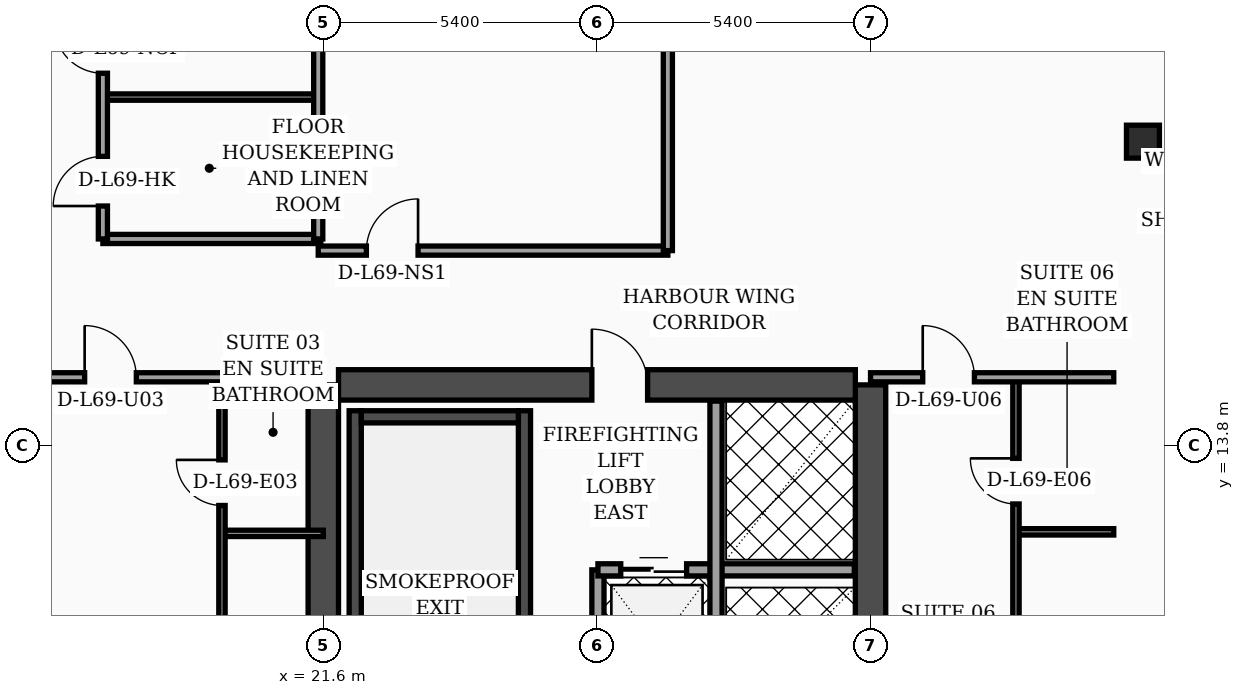
"""IFC4 building model, lengths in metres.
Left out: names, types, materials, properties, quantities, classifications, styles, units other than length and angle.
Written with IfcOpenShell. Run it as: python <this file> out.ifc"""

import sys

from ifc_helpers import new_model, si_unit, direction, frame, frame_2d, origin, origin_2d, place, context, subcontext, project, spatial, rectangle, hollow_rectangle, extrude, element, fill, save


model = new_model("IFC4")
c1 = context("Model", 3, precision=1e-05, world=origin(), true_north=direction((0.0, 1.0)))
c2 = subcontext(c1, "Body", "Model", "MODEL_VIEW")
j1 = project(units=[si_unit("LENGTHUNIT", "METRE"), si_unit("PLANEANGLEUNIT", "RADIAN")], contexts=[c1])
p1 = place(None, origin())
s1 = spatial("IfcSite", under=j1, at=p1, CompositionType="ELEMENT")
p2 = place(p1, origin())
s2 = spatial("IfcBuilding", under=s1, at=p2, CompositionType="ELEMENT")
p3 = place(p2, frame((0.0, 0.0, 278.7)))
s3 = spatial("IfcBuildingStorey", under=s2, at=p3, CompositionType="ELEMENT", Elevation=278.7)
for number, where, z_axis, x_axis in (
    (1, (21.6, 4.6, 0.0), (0.0, 0.0, 1.0), (0.0, 1.0, 0.0)),
    (2, (32.4, 4.6, 0.0), (0.0, 0.0, 1.0), (0.0, 1.0, 0.0)),
):
    element("IfcWall", number, at=place(p3, frame(where, z_axis=z_axis, x_axis=x_axis)), inside=s3, PredefinedType="SHEAR", context=c2, shape_type="SweptSolid", body=[
        extrude(rectangle(XDim=10.4, YDim=0.6, at=frame_2d((5.2, 0.0))), origin(), (0.0, 0.0, 1.0), 3.52),
    ])
p4 = place(p3, frame((21.9, 15.0, 0.0), z_axis=(0.0, 0.0, 1.0), x_axis=(1.0, 0.0, 0.0)))
e3 = element("IfcWall", 3, at=p4, inside=s3, PredefinedType="SHEAR", context=c2, shape_type="SweptSolid", body=[
    extrude(rectangle(XDim=10.2, YDim=0.6, at=frame_2d((5.1, 0.0))), origin(), (0.0, 0.0, 1.0), 3.52),
])
p5 = place(p4, frame((5.0, 0.0, 0.0)))
e4 = element("IfcOpeningElement", 4, at=p5, cuts=e3, PredefinedType="OPENING", context=c2, shape_type="SweptSolid", body=[
    extrude(rectangle(XDim=1.1, YDim=2.2, at=frame_2d((0.55, 1.1))), frame((0.0, 0.31, 0.0), z_axis=(0.0, -1.0, 0.0), x_axis=(1.0, 0.0, 0.0)), (0.0, 0.0, 1.0), 0.62),
])
p6 = place(p3, frame((22.23, 4.9, 0.0), z_axis=(0.0, 0.0, 1.0), x_axis=(0.0, 1.0, 0.0)))
e5 = element("IfcWall", 5, at=p6, inside=s3, PredefinedType="SOLIDWALL", context=c2, shape_type="SweptSolid", body=[
    extrude(rectangle(XDim=9.59, YDim=0.24, at=frame_2d((4.795, 0.0))), origin(), (0.0, 0.0, 1.0), 3.52),
])
p7 = place(p3, frame((25.57, 4.9, 0.0), z_axis=(0.0, 0.0, 1.0), x_axis=(0.0, 1.0, 0.0)))
e6 = element("IfcWall", 6, at=p7, inside=s3, PredefinedType="SOLIDWALL", context=c2, shape_type="SweptSolid", body=[
    extrude(rectangle(XDim=9.59, YDim=0.24, at=frame_2d((4.795, 0.0))), origin(), (0.0, 0.0, 1.0), 3.52),
])
p8 = place(p7, frame((0.35, 0.0, 0.0)))
e7 = element("IfcOpeningElement", 7, at=p8, cuts=e6, PredefinedType="OPENING", context=c2, shape_type="SweptSolid", body=[
    extrude(rectangle(XDim=1.15, YDim=2.2, at=frame_2d((0.575, 1.1))), frame((0.0, 0.13, 0.0), z_axis=(0.0, -1.0, 0.0), x_axis=(1.0, 0.0, 0.0)), (0.0, 0.0, 1.0), 0.26),
])
p9 = place(p3, frame((22.35, 14.37, 0.0), z_axis=(0.0, 0.0, 1.0), x_axis=(1.0, 0.0, 0.0)))
e8 = element("IfcWall", 8, at=p9, inside=s3, PredefinedType="SOLIDWALL", context=c2, shape_type="SweptSolid", body=[
    extrude(rectangle(XDim=3.1, YDim=0.24, at=frame_2d((1.55, 0.0))), origin(), (0.0, 0.0, 1.0), 3.52),
])
p10 = place(p3, frame((37.776, 19.8, 0.0), z_axis=(0.0, 0.0, 1.0), x_axis=(1.0, 0.0, 0.0)))
e9 = element("IfcColumn", 9, at=p10, inside=s3, PredefinedType="COLUMN", context=c2, shape_type="SweptSolid", body=[
    extrude(hollow_rectangle(XDim=0.65, YDim=0.65, WallThickness=0.028, at=origin_2d()), origin(), (0.0, 0.0, 1.0), 3.52),
])
p11 = place(p3, frame((43.83, 5.505, 0.0), z_axis=(0.0, 0.0, 1.0), x_axis=(-0.300509063924, 0.953778958931, 0.0)))
e10 = element("IfcWall", 10, at=p11, inside=s3, PredefinedType="SOLIDWALL", context=c2, shape_type="SweptSolid", body=[
    extrude(rectangle(XDim=30.814, YDim=0.32, at=frame_2d((15.407, 0.0))), origin(), (0.0, 0.0, 1.0), 3.52),
])
p12 = place(p11, frame((18.796, 0.0, 0.0)))
e11 = element("IfcOpeningElement", 11, at=p12, cuts=e10, PredefinedType="OPENING", context=c2, shape_type="SweptSolid", body=[
    extrude(rectangle(XDim=1.4, YDim=2.25, at=frame_2d((0.7, 1.125))), frame((0.0, 0.17, 0.0), z_axis=(0.0, -1.0, 0.0), x_axis=(1.0, 0.0, 0.0)), (0.0, 0.0, 1.0), 0.34),
])
p13 = place(p11, frame((4.437, 0.0, 0.7)))
e12 = element("IfcOpeningElement", 12, at=p13, cuts=e10, PredefinedType="OPENING", context=c2, shape_type="SweptSolid", body=[
    extrude(rectangle(XDim=1.6, YDim=1.65, at=frame_2d((0.8, 0.825))), frame((0.0, 0.17, 0.0), z_axis=(0.0, -1.0, 0.0), x_axis=(1.0, 0.0, 0.0)), (0.0, 0.0, 1.0), 0.34),
])
p14 = place(p11, frame((9.889, 0.0, 0.7)))
e13 = element("IfcOpeningElement", 13, at=p14, cuts=e10, PredefinedType="OPENING", context=c2, shape_type="SweptSolid", body=[
    extrude(rectangle(XDim=1.6, YDim=1.65, at=frame_2d((0.8, 0.825))), frame((0.0, 0.17, 0.0), z_axis=(0.0, -1.0, 0.0), x_axis=(1.0, 0.0, 0.0)), (0.0, 0.0, 1.0), 0.34),
])
p15 = place(p11, frame((1.6, 0.0, 0.75)))
e14 = element("IfcOpeningElement", 14, at=p15, cuts=e10, PredefinedType="OPENING", context=c2, shape_type="SweptSolid", body=[
    extrude(rectangle(XDim=1.5, YDim=1.6, at=frame_2d((0.75, 0.8))), frame((0.0, 0.17, 0.0), z_axis=(0.0, -1.0, 0.0), x_axis=(1.0, 0.0, 0.0)), (0.0, 0.0, 1.0), 0.34),
])
p16 = place(p11, frame((7.8, 0.0, 0.75)))
e15 = element("IfcOpeningElement", 15, at=p16, cuts=e10, PredefinedType="OPENING", context=c2, shape_type="SweptSolid", body=[
    extrude(rectangle(XDim=1.5, YDim=1.6, at=frame_2d((0.75, 0.8))), frame((0.0, 0.17, 0.0), z_axis=(0.0, -1.0, 0.0), x_axis=(1.0, 0.0, 0.0)), (0.0, 0.0, 1.0), 0.34),
])
p17 = place(p11, frame((11.95, 0.0, 0.75)))
e16 = element("IfcOpeningElement", 16, at=p17, cuts=e10, PredefinedType="OPENING", context=c2, shape_type="SweptSolid", body=[
    extrude(rectangle(XDim=1.5, YDim=1.6, at=frame_2d((0.75, 0.8))), frame((0.0, 0.17, 0.0), z_axis=(0.0, -1.0, 0.0), x_axis=(1.0, 0.0, 0.0)), (0.0, 0.0, 1.0), 0.34),
])
p18 = place(p11, frame((14.0, 0.0, 0.75)))
e17 = element("IfcOpeningElement", 17, at=p18, cuts=e10, PredefinedType="OPENING", context=c2, shape_type="SweptSolid", body=[
    extrude(rectangle(XDim=1.5, YDim=1.6, at=frame_2d((0.75, 0.8))), frame((0.0, 0.17, 0.0), z_axis=(0.0, -1.0, 0.0), x_axis=(1.0, 0.0, 0.0)), (0.0, 0.0, 1.0), 0.34),
])
p19 = place(p11, frame((16.55, 0.0, 0.75)))
e18 = element("IfcOpeningElement", 18, at=p19, cuts=e10, PredefinedType="OPENING", context=c2, shape_type="SweptSolid", body=[
    extrude(rectangle(XDim=1.5, YDim=1.6, at=frame_2d((0.75, 0.8))), frame((0.0, 0.17, 0.0), z_axis=(0.0, -1.0, 0.0), x_axis=(1.0, 0.0, 0.0)), (0.0, 0.0, 1.0), 0.34),
])
p20 = place(p11, frame((20.75, 0.0, 0.75)))
e19 = element("IfcOpeningElement", 19, at=p20, cuts=e10, PredefinedType="OPENING", context=c2, shape_type="SweptSolid", body=[
    extrude(rectangle(XDim=1.5, YDim=1.6, at=frame_2d((0.75, 0.8))), frame((0.0, 0.17, 0.0), z_axis=(0.0, -1.0, 0.0), x_axis=(1.0, 0.0, 0.0)), (0.0, 0.0, 1.0), 0.34),
])
p21 = place(p11, frame((23.3, 0.0, 0.75)))
e20 = element("IfcOpeningElement", 20, at=p21, cuts=e10, PredefinedType="OPENING", context=c2, shape_type="SweptSolid", body=[
    extrude(rectangle(XDim=1.5, YDim=1.6, at=frame_2d((0.75, 0.8))), frame((0.0, 0.17, 0.0), z_axis=(0.0, -1.0, 0.0), x_axis=(1.0, 0.0, 0.0)), (0.0, 0.0, 1.0), 0.34),
])
p22 = place(p11, frame((26.4, 0.0, 0.75)))
e21 = element("IfcOpeningElement", 21, at=p22, cuts=e10, PredefinedType="OPENING", context=c2, shape_type="SweptSolid", body=[
    extrude(rectangle(XDim=1.5, YDim=1.6, at=frame_2d((0.75, 0.8))), frame((0.0, 0.17, 0.0), z_axis=(0.0, -1.0, 0.0), x_axis=(1.0, 0.0, 0.0)), (0.0, 0.0, 1.0), 0.34),
])
p23 = place(p3, frame((27.02, 4.92, 0.0), z_axis=(0.0, 0.0, 1.0), x_axis=(0.0, 1.0, 0.0)))
e22 = element("IfcWall", 22, at=p23, inside=s3, PredefinedType="SOLIDWALL", context=c2, shape_type="SweptSolid", body=[
    extrude(rectangle(XDim=6.43, YDim=0.24, at=frame_2d((3.215, 0.0))), origin(), (0.0, 0.0, 1.0), 3.52),
])
p24 = place(p3, frame((27.02, 11.35, 0.0), z_axis=(0.0, 0.0, 1.0), x_axis=(1.0, 0.0, 0.0)))
e23 = element("IfcWall", 23, at=p24, inside=s3, PredefinedType="SOLIDWALL", context=c2, shape_type="SweptSolid", body=[
    extrude(rectangle(XDim=5.06, YDim=0.24, at=frame_2d((2.53, 0.0))), origin(), (0.0, 0.0, 1.0), 3.52),
])
p25 = place(p24, frame((0.45, 0.0, 0.0)))
e24 = element("IfcOpeningElement", 24, at=p25, cuts=e23, PredefinedType="OPENING", context=c2, shape_type="SweptSolid", body=[
    extrude(rectangle(XDim=1.3, YDim=2.35, at=frame_2d((0.65, 1.175))), frame((0.0, 0.13, 0.0), z_axis=(0.0, -1.0, 0.0), x_axis=(1.0, 0.0, 0.0)), (0.0, 0.0, 1.0), 0.26),
])
p26 = place(p3, frame((29.35, 4.92, 0.0), z_axis=(0.0, 0.0, 1.0), x_axis=(0.0, 1.0, 0.0)))
e25 = element("IfcWall", 25, at=p26, inside=s3, PredefinedType="SOLIDWALL", context=c2, shape_type="SweptSolid", body=[
    extrude(rectangle(XDim=9.76, YDim=0.24, at=frame_2d((4.88, 0.0))), origin(), (0.0, 0.0, 1.0), 3.52),
])
p27 = place(p26, frame((0.55, 0.0, 0.0)))
e26 = element("IfcOpeningElement", 26, at=p27, cuts=e25, PredefinedType="OPENING", context=c2, shape_type="SweptSolid", body=[
    extrude(rectangle(XDim=1.3, YDim=2.35, at=frame_2d((0.65, 1.175))), frame((0.0, 0.13, 0.0), z_axis=(0.0, -1.0, 0.0), x_axis=(1.0, 0.0, 0.0)), (0.0, 0.0, 1.0), 0.26),
])
p28 = place(p3, frame((19.6, 12.07, 0.0), z_axis=(0.0, 0.0, 1.0), x_axis=(1.0, 0.0, 0.0)))
e27 = element("IfcWall", 27, at=p28, inside=s3, PredefinedType="PARTITIONING", context=c2, shape_type="SweptSolid", body=[
    extrude(rectangle(XDim=2.0, YDim=0.125, at=frame_2d((1.0, 0.0))), origin(), (0.0, 0.0, 1.0), 3.52),
])
p29 = place(p3, frame((19.6, 2.44, 0.0), z_axis=(0.0, 0.0, 1.0), x_axis=(0.0, 1.0, 0.0)))
e28 = element("IfcWall", 28, at=p29, inside=s3, PredefinedType="PARTITIONING", context=c2, shape_type="SweptSolid", body=[
    extrude(rectangle(XDim=12.71, YDim=0.125, at=frame_2d((6.355, 0.0))), origin(), (0.0, 0.0, 1.0), 2.57),
])
p30 = place(p29, frame((4.34, 0.0, 0.0)))
e29 = element("IfcOpeningElement", 29, at=p30, cuts=e28, PredefinedType="OPENING", context=c2, shape_type="SweptSolid", body=[
    extrude(rectangle(XDim=0.96, YDim=2.2, at=frame_2d((0.48, 1.1))), frame((0.0, 0.073, 0.0), z_axis=(0.0, -1.0, 0.0), x_axis=(1.0, 0.0, 0.0)), (0.0, 0.0, 1.0), 0.145),
])
p31 = place(p29, frame((10.18, 0.0, 0.0)))
e30 = element("IfcOpeningElement", 30, at=p31, cuts=e28, PredefinedType="OPENING", context=c2, shape_type="SweptSolid", body=[
    extrude(rectangle(XDim=0.9, YDim=2.15, at=frame_2d((0.45, 1.075))), frame((0.0, 0.073, 0.0), z_axis=(0.0, -1.0, 0.0), x_axis=(1.0, 0.0, 0.0)), (0.0, 0.0, 1.0), 0.145),
])
p32 = place(p3, frame((15.15, 15.15, 0.0), z_axis=(0.0, 0.0, 1.0), x_axis=(1.0, 0.0, 0.0)))
e31 = element("IfcWall", 31, at=p32, inside=s3, PredefinedType="PARTITIONING", context=c2, shape_type="SweptSolid", body=[
    extrude(rectangle(XDim=6.45, YDim=0.18, at=frame_2d((3.225, 0.0))), origin(), (0.0, 0.0, 1.0), 2.57),
])
p33 = place(p32, frame((1.74, 0.0, 0.0)))
e32 = element("IfcOpeningElement", 32, at=p33, cuts=e31, PredefinedType="OPENING", context=c2, shape_type="SweptSolid", body=[
    extrude(rectangle(XDim=1.02, YDim=2.2, at=frame_2d((0.51, 1.1))), frame((0.0, 0.1, 0.0), z_axis=(0.0, -1.0, 0.0), x_axis=(1.0, 0.0, 0.0)), (0.0, 0.0, 1.0), 0.2),
])
p34 = place(p3, frame((17.25, 17.88, 0.0), z_axis=(0.0, 0.0, 1.0), x_axis=(1.0, 0.0, 0.0)))
e33 = element("IfcWall", 33, at=p34, inside=s3, PredefinedType="PARTITIONING", context=c2, shape_type="SweptSolid", body=[
    extrude(rectangle(XDim=4.3, YDim=0.18, at=frame_2d((2.15, 0.0))), origin(), (0.0, 0.0, 1.0), 3.52),
])
p35 = place(p3, frame((17.25, 20.68, 0.0), z_axis=(0.0, 0.0, 1.0), x_axis=(1.0, 0.0, 0.0)))
e34 = element("IfcWall", 34, at=p35, inside=s3, PredefinedType="PARTITIONING", context=c2, shape_type="SweptSolid", body=[
    extrude(rectangle(XDim=4.3, YDim=0.125, at=frame_2d((2.15, 0.0))), origin(), (0.0, 0.0, 1.0), 3.52),
])
p36 = place(p3, frame((21.5, 17.88, 0.0), z_axis=(0.0, 0.0, 1.0), x_axis=(0.0, 1.0, 0.0)))
e35 = element("IfcWall", 35, at=p36, inside=s3, PredefinedType="PARTITIONING", context=c2, shape_type="SweptSolid", body=[
    extrude(rectangle(XDim=6.44, YDim=0.18, at=frame_2d((3.22, 0.0))), origin(), (0.0, 0.0, 1.0), 3.52),
])
p37 = place(p3, frame((17.25, 17.88, 0.0), z_axis=(0.0, 0.0, 1.0), x_axis=(0.0, 1.0, 0.0)))
e36 = element("IfcWall", 36, at=p37, inside=s3, PredefinedType="PARTITIONING", context=c2, shape_type="SweptSolid", body=[
    extrude(rectangle(XDim=6.44, YDim=0.18, at=frame_2d((3.22, 0.0))), origin(), (0.0, 0.0, 1.0), 3.52),
])
p38 = place(p37, frame((0.65, 0.0, 0.0)))
e37 = element("IfcOpeningElement", 37, at=p38, cuts=e36, PredefinedType="OPENING", context=c2, shape_type="SweptSolid", body=[
    extrude(rectangle(XDim=0.98, YDim=2.15, at=frame_2d((0.49, 1.075))), frame((0.0, 0.1, 0.0), z_axis=(0.0, -1.0, 0.0), x_axis=(1.0, 0.0, 0.0)), (0.0, 0.0, 1.0), 0.2),
])
p39 = place(p37, frame((3.27, 0.0, 0.0)))
e38 = element("IfcOpeningElement", 38, at=p39, cuts=e36, PredefinedType="OPENING", context=c2, shape_type="SweptSolid", body=[
    extrude(rectangle(XDim=0.96, YDim=2.2, at=frame_2d((0.48, 1.1))), frame((0.0, 0.1, 0.0), z_axis=(0.0, -1.0, 0.0), x_axis=(1.0, 0.0, 0.0)), (0.0, 0.0, 1.0), 0.2),
])
p40 = place(p3, frame((35.27, 12.1, 0.0), z_axis=(0.0, 0.0, 1.0), x_axis=(1.0, 0.0, 0.0)))
e39 = element("IfcWall", 39, at=p40, inside=s3, PredefinedType="PARTITIONING", context=c2, shape_type="SweptSolid", body=[
    extrude(rectangle(XDim=1.93, YDim=0.125, at=frame_2d((0.965, 0.0))), origin(), (0.0, 0.0, 1.0), 3.52),
])
p41 = place(p3, frame((35.27, 2.44, 0.0), z_axis=(0.0, 0.0, 1.0), x_axis=(0.0, 1.0, 0.0)))
e40 = element("IfcWall", 40, at=p41, inside=s3, PredefinedType="PARTITIONING", context=c2, shape_type="SweptSolid", body=[
    extrude(rectangle(XDim=12.71, YDim=0.125, at=frame_2d((6.355, 0.0))), origin(), (0.0, 0.0, 1.0), 2.97),
])
p42 = place(p41, frame((4.35, 0.0, 0.0)))
e41 = element("IfcOpeningElement", 41, at=p42, cuts=e40, PredefinedType="OPENING", context=c2, shape_type="SweptSolid", body=[
    extrude(rectangle(XDim=0.96, YDim=2.2, at=frame_2d((0.48, 1.1))), frame((0.0, 0.073, 0.0), z_axis=(0.0, -1.0, 0.0), x_axis=(1.0, 0.0, 0.0)), (0.0, 0.0, 1.0), 0.145),
])
p43 = place(p41, frame((10.21, 0.0, 0.0)))
e42 = element("IfcOpeningElement", 42, at=p43, cuts=e40, PredefinedType="OPENING", context=c2, shape_type="SweptSolid", body=[
    extrude(rectangle(XDim=0.9, YDim=2.15, at=frame_2d((0.45, 1.075))), frame((0.0, 0.073, 0.0), z_axis=(0.0, -1.0, 0.0), x_axis=(1.0, 0.0, 0.0)), (0.0, 0.0, 1.0), 0.145),
])
p44 = place(p3, frame((32.4, 15.15, 0.0), z_axis=(0.0, 0.0, 1.0), x_axis=(1.0, 0.0, 0.0)))
e43 = element("IfcWall", 43, at=p44, inside=s3, PredefinedType="PARTITIONING", context=c2, shape_type="SweptSolid", body=[
    extrude(rectangle(XDim=4.8, YDim=0.18, at=frame_2d((2.4, 0.0))), origin(), (0.0, 0.0, 1.0), 2.97),
])
p45 = place(p44, frame((1.03, 0.0, 0.0)))
e44 = element("IfcOpeningElement", 44, at=p45, cuts=e43, PredefinedType="OPENING", context=c2, shape_type="SweptSolid", body=[
    extrude(rectangle(XDim=1.02, YDim=2.2, at=frame_2d((0.51, 1.1))), frame((0.0, 0.1, 0.0), z_axis=(0.0, -1.0, 0.0), x_axis=(1.0, 0.0, 0.0)), (0.0, 0.0, 1.0), 0.2),
])
p46 = place(p3, frame((21.5, 17.65, 0.0), z_axis=(0.0, 0.0, 1.0), x_axis=(1.0, 0.0, 0.0)))
e45 = element("IfcWall", 45, at=p46, inside=s3, PredefinedType="PARTITIONING", context=c2, shape_type="SweptSolid", body=[
    extrude(rectangle(XDim=6.9, YDim=0.18, at=frame_2d((3.45, 0.0))), origin(), (0.0, 0.0, 1.0), 3.52),
])
p47 = place(p46, frame((0.95, 0.0, 0.0)))
e46 = element("IfcOpeningElement", 46, at=p47, cuts=e45, PredefinedType="OPENING", context=c2, shape_type="SweptSolid", body=[
    extrude(rectangle(XDim=1.02, YDim=2.2, at=frame_2d((0.51, 1.1))), frame((0.0, 0.1, 0.0), z_axis=(0.0, -1.0, 0.0), x_axis=(1.0, 0.0, 0.0)), (0.0, 0.0, 1.0), 0.2),
])
p48 = place(p3, frame((28.4, 17.65, 0.0), z_axis=(0.0, 0.0, 1.0), x_axis=(0.0, 1.0, 0.0)))
e47 = element("IfcWall", 47, at=p48, inside=s3, PredefinedType="PARTITIONING", context=c2, shape_type="SweptSolid", body=[
    extrude(rectangle(XDim=17.11, YDim=0.18, at=frame_2d((8.555, 0.0))), origin(), (0.0, 0.0, 1.0), 3.07),
])
p49 = place(p25, origin())
e48 = element("IfcDoor", 48, at=p49, inside=s3, OperationType="DOUBLE_DOOR_SLIDING", PredefinedType="DOOR", context=c2, shape_type="SweptSolid", body=[
    extrude(rectangle(XDim=1.3, YDim=2.35, at=frame_2d((0.65, 1.175))), frame((0.0, 0.025, 0.0), z_axis=(0.0, -1.0, 0.0), x_axis=(1.0, 0.0, 0.0)), (0.0, 0.0, 1.0), 0.05),
])
fill(e24, e48)
p50 = place(p31, origin())
e49 = element("IfcDoor", 49, at=p50, inside=s3, OperationType="SINGLE_SWING_RIGHT", PredefinedType="DOOR", context=c2, shape_type="SweptSolid", body=[
    extrude(rectangle(XDim=0.9, YDim=2.15, at=frame_2d((0.45, 1.075))), frame((0.0, 0.025, 0.0), z_axis=(0.0, -1.0, 0.0), x_axis=(1.0, 0.0, 0.0)), (0.0, 0.0, 1.0), 0.05),
])
fill(e30, e49)
p51 = place(p33, origin())
e50 = element("IfcDoor", 50, at=p51, inside=s3, OperationType="SINGLE_SWING_LEFT", PredefinedType="DOOR", context=c2, shape_type="SweptSolid", body=[
    extrude(rectangle(XDim=1.02, YDim=2.2, at=frame_2d((0.51, 1.1))), frame((0.0, 0.025, 0.0), z_axis=(0.0, -1.0, 0.0), x_axis=(1.0, 0.0, 0.0)), (0.0, 0.0, 1.0), 0.05),
])
fill(e32, e50)
p52 = place(p38, origin())
e51 = element("IfcDoor", 51, at=p52, inside=s3, OperationType="SINGLE_SWING_LEFT", PredefinedType="DOOR", context=c2, shape_type="SweptSolid", body=[
    extrude(rectangle(XDim=0.98, YDim=2.15, at=frame_2d((0.49, 1.075))), frame((0.0, 0.025, 0.0), z_axis=(0.0, -1.0, 0.0), x_axis=(1.0, 0.0, 0.0)), (0.0, 0.0, 1.0), 0.05),
])
fill(e37, e51)
p53 = place(p39, origin())
e52 = element("IfcDoor", 52, at=p53, inside=s3, OperationType="SINGLE_SWING_RIGHT", PredefinedType="DOOR", context=c2, shape_type="SweptSolid", body=[
    extrude(rectangle(XDim=0.96, YDim=2.2, at=frame_2d((0.48, 1.1))), frame((0.0, 0.025, 0.0), z_axis=(0.0, -1.0, 0.0), x_axis=(1.0, 0.0, 0.0)), (0.0, 0.0, 1.0), 0.05),
])
fill(e38, e52)
p54 = place(p43, origin())
e53 = element("IfcDoor", 53, at=p54, inside=s3, OperationType="SINGLE_SWING_RIGHT", PredefinedType="DOOR", context=c2, shape_type="SweptSolid", body=[
    extrude(rectangle(XDim=0.9, YDim=2.15, at=frame_2d((0.45, 1.075))), frame((0.0, 0.025, 0.0), z_axis=(0.0, -1.0, 0.0), x_axis=(1.0, 0.0, 0.0)), (0.0, 0.0, 1.0), 0.05),
])
fill(e42, e53)
p55 = place(p45, origin())
e54 = element("IfcDoor", 54, at=p55, inside=s3, OperationType="SINGLE_SWING_LEFT", PredefinedType="DOOR", context=c2, shape_type="SweptSolid", body=[
    extrude(rectangle(XDim=1.02, YDim=2.2, at=frame_2d((0.51, 1.1))), frame((0.0, 0.025, 0.0), z_axis=(0.0, -1.0, 0.0), x_axis=(1.0, 0.0, 0.0)), (0.0, 0.0, 1.0), 0.05),
])
fill(e44, e54)
p56 = place(p47, origin())
e55 = element("IfcDoor", 55, at=p56, inside=s3, OperationType="SINGLE_SWING_RIGHT", PredefinedType="DOOR", context=c2, shape_type="SweptSolid", body=[
    extrude(rectangle(XDim=1.02, YDim=2.2, at=frame_2d((0.51, 1.1))), frame((0.0, 0.025, 0.0), z_axis=(0.0, -1.0, 0.0), x_axis=(1.0, 0.0, 0.0)), (0.0, 0.0, 1.0), 0.05),
])
fill(e46, e55)
p57 = place(p5, origin())
e56 = element("IfcDoor", 56, at=p57, inside=s3, OperationType="SINGLE_SWING_LEFT", PredefinedType="DOOR", context=c2, shape_type="SweptSolid", body=[
    extrude(rectangle(XDim=1.1, YDim=2.2, at=frame_2d((0.55, 1.1))), frame((0.0, 0.025, 0.0), z_axis=(0.0, -1.0, 0.0), x_axis=(1.0, 0.0, 0.0)), (0.0, 0.0, 1.0), 0.05),
])
fill(e4, e56)
save(model, sys.argv[1])
